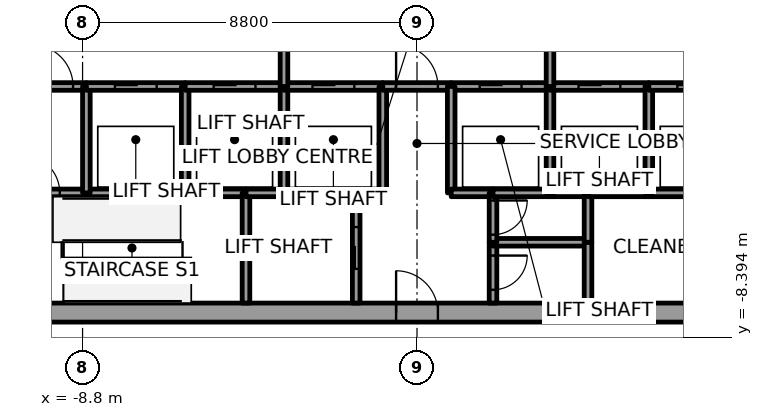
"""IFC4 building model, lengths in metres.
Left out: names, types, materials, properties, quantities, classifications, styles, units other than length and angle.
Written with IfcOpenShell. Run it as: python <this file> out.ifc"""

import sys

from ifc_helpers import new_model, si_unit, direction, frame, frame_2d, origin, place, context, subcontext, project, spatial, rectangle, extrude, element, fill, save


model = new_model("IFC4")
c1 = context("Model", 3, precision=1e-05, world=origin(), true_north=direction((0.0, 1.0)))
c2 = subcontext(c1, "Body", "Model", "MODEL_VIEW")
j1 = project(units=[si_unit("LENGTHUNIT", "METRE"), si_unit("PLANEANGLEUNIT", "RADIAN")], contexts=[c1])
p1 = place(None, origin())
s1 = spatial("IfcSite", under=j1, at=p1, CompositionType="ELEMENT")
p2 = place(p1, origin())
s2 = spatial("IfcBuilding", under=s1, at=p2, CompositionType="ELEMENT")
p3 = place(p2, frame((0.0, 0.0, 205.8)))
s3 = spatial("IfcBuildingStorey", under=s2, at=p3, CompositionType="ELEMENT", Elevation=205.8)
p4 = place(p3, frame((-11.0, -7.75, 0.0), z_axis=(0.0, 0.0, 1.0), x_axis=(1.0, 0.0, 0.0)))
e1 = element("IfcWall", 1, at=p4, inside=s3, PredefinedType="SHEAR", context=c2, shape_type="SweptSolid", body=[
    extrude(rectangle(XDim=22.0, YDim=0.5, at=frame_2d((11.0, 0.0))), origin(), (0.0, 0.0, 1.0), 4.0),
])
p5 = place(p4, frame((10.45, 0.0, 0.0)))
e2 = element("IfcOpeningElement", 2, at=p5, cuts=e1, PredefinedType="OPENING", context=c2, shape_type="SweptSolid", body=[
    extrude(rectangle(XDim=1.1, YDim=2.1, at=frame_2d((0.55, 1.05))), frame((0.0, 0.25, 0.0), z_axis=(0.0, -1.0, 0.0), x_axis=(1.0, 0.0, 0.0)), (0.0, 0.0, 1.0), 0.5),
])
p6 = place(p3, frame((-10.5, -4.6, 0.0), z_axis=(0.0, 0.0, 1.0), x_axis=(1.0, 0.0, 0.0)))
e3 = element("IfcWall", 3, at=p6, inside=s3, PredefinedType="SOLIDWALL", context=c2, shape_type="SweptSolid", body=[
    extrude(rectangle(XDim=1.8, YDim=0.2, at=frame_2d((0.9, 0.0))), origin(), (0.0, 0.0, 1.0), 3.85),
])
p7 = place(p6, frame((0.1, 0.0, 0.0)))
e4 = element("IfcOpeningElement", 4, at=p7, cuts=e3, PredefinedType="OPENING", context=c2, shape_type="SweptSolid", body=[
    extrude(rectangle(XDim=1.0, YDim=2.1, at=frame_2d((0.5, 1.05))), frame((0.0, 0.1, 0.0), z_axis=(0.0, -1.0, 0.0), x_axis=(1.0, 0.0, 0.0)), (0.0, 0.0, 1.0), 0.2),
])
p8 = place(p3, frame((-10.5, -1.8, 0.0), z_axis=(0.0, 0.0, 1.0), x_axis=(1.0, 0.0, 0.0)))
e5 = element("IfcWall", 5, at=p8, inside=s3, PredefinedType="SOLIDWALL", context=c2, shape_type="SweptSolid", body=[
    extrude(rectangle(XDim=1.8, YDim=0.2, at=frame_2d((0.9, 0.0))), origin(), (0.0, 0.0, 1.0), 3.85),
])
p9 = place(p8, frame((0.35, 0.0, 0.0)))
e6 = element("IfcOpeningElement", 6, at=p9, cuts=e5, PredefinedType="OPENING", context=c2, shape_type="SweptSolid", body=[
    extrude(rectangle(XDim=1.1, YDim=2.1, at=frame_2d((0.55, 1.05))), frame((0.0, 0.1, 0.0), z_axis=(0.0, -1.0, 0.0), x_axis=(1.0, 0.0, 0.0)), (0.0, 0.0, 1.0), 0.2),
])
p10 = place(p3, frame((-8.7, -4.6, 0.0), z_axis=(0.0, 0.0, 1.0), x_axis=(1.0, 0.0, 0.0)))
e7 = element("IfcWall", 7, at=p10, inside=s3, PredefinedType="SOLIDWALL", context=c2, shape_type="SweptSolid", body=[
    extrude(rectangle(XDim=2.6, YDim=0.2, at=frame_2d((1.3, 0.0))), origin(), (0.0, 0.0, 1.0), 3.85),
])
p11 = place(p3, frame((-8.7, -4.6, 0.0), z_axis=(0.0, 0.0, 1.0), x_axis=(0.0, 1.0, 0.0)))
e8 = element("IfcWall", 8, at=p11, inside=s3, PredefinedType="SOLIDWALL", context=c2, shape_type="SweptSolid", body=[
    extrude(rectangle(XDim=2.8, YDim=0.2, at=frame_2d((1.4, 0.0))), origin(), (0.0, 0.0, 1.0), 3.85),
])
p12 = place(p3, frame((-8.7, -1.8, 0.0), z_axis=(0.0, 0.0, 1.0), x_axis=(1.0, 0.0, 0.0)))
e9 = element("IfcWall", 9, at=p12, inside=s3, PredefinedType="SOLIDWALL", context=c2, shape_type="SweptSolid", body=[
    extrude(rectangle(XDim=2.6, YDim=0.2, at=frame_2d((1.3, 0.0))), origin(), (0.0, 0.0, 1.0), 3.85),
])
p13 = place(p12, frame((0.75, 0.0, 0.0)))
e10 = element("IfcOpeningElement", 10, at=p13, cuts=e9, PredefinedType="OPENING", context=c2, shape_type="SweptSolid", body=[
    extrude(rectangle(XDim=1.1, YDim=2.1, at=frame_2d((0.55, 1.05))), frame((0.0, 0.1, 0.0), z_axis=(0.0, -1.0, 0.0), x_axis=(1.0, 0.0, 0.0)), (0.0, 0.0, 1.0), 0.2),
])
p14 = place(p3, frame((-6.1, -4.6, 0.0), z_axis=(0.0, 0.0, 1.0), x_axis=(1.0, 0.0, 0.0)))
e11 = element("IfcWall", 11, at=p14, inside=s3, PredefinedType="SOLIDWALL", context=c2, shape_type="SweptSolid", body=[
    extrude(rectangle(XDim=1.6, YDim=0.2, at=frame_2d((0.8, 0.0))), origin(), (0.0, 0.0, 1.0), 3.85),
])
p15 = place(p3, frame((-6.1, -4.6, 0.0), z_axis=(0.0, 0.0, 1.0), x_axis=(0.0, 1.0, 0.0)))
e12 = element("IfcWall", 12, at=p15, inside=s3, PredefinedType="SOLIDWALL", context=c2, shape_type="SweptSolid", body=[
    extrude(rectangle(XDim=2.8, YDim=0.2, at=frame_2d((1.4, 0.0))), origin(), (0.0, 0.0, 1.0), 3.85),
])
p16 = place(p3, frame((-6.1, -1.8, 0.0), z_axis=(0.0, 0.0, 1.0), x_axis=(1.0, 0.0, 0.0)))
e13 = element("IfcWall", 13, at=p16, inside=s3, PredefinedType="SOLIDWALL", context=c2, shape_type="SweptSolid", body=[
    extrude(rectangle(XDim=2.6, YDim=0.2, at=frame_2d((1.3, 0.0))), origin(), (0.0, 0.0, 1.0), 3.85),
])
p17 = place(p16, frame((0.75, 0.0, 0.0)))
e14 = element("IfcOpeningElement", 14, at=p17, cuts=e13, PredefinedType="OPENING", context=c2, shape_type="SweptSolid", body=[
    extrude(rectangle(XDim=1.1, YDim=2.1, at=frame_2d((0.55, 1.05))), frame((0.0, 0.1, 0.0), z_axis=(0.0, -1.0, 0.0), x_axis=(1.0, 0.0, 0.0)), (0.0, 0.0, 1.0), 0.2),
])
p18 = place(p3, frame((-4.5, -4.6, 0.0), z_axis=(0.0, 0.0, 1.0), x_axis=(0.0, -1.0, 0.0)))
e15 = element("IfcWall", 15, at=p18, inside=s3, PredefinedType="SOLIDWALL", context=c2, shape_type="SweptSolid", body=[
    extrude(rectangle(XDim=2.9, YDim=0.2, at=frame_2d((1.45, 0.0))), origin(), (0.0, 0.0, 1.0), 3.85),
])
p19 = place(p3, frame((-4.5, -4.6, 0.0), z_axis=(0.0, 0.0, 1.0), x_axis=(1.0, 0.0, 0.0)))
e16 = element("IfcWall", 16, at=p19, inside=s3, PredefinedType="SOLIDWALL", context=c2, shape_type="SweptSolid", body=[
    extrude(rectangle(XDim=1.0, YDim=0.2, at=frame_2d((0.5, 0.0))), origin(), (0.0, 0.0, 1.0), 3.85),
])
p20 = place(p3, frame((-3.5, -4.6, 0.0), z_axis=(0.0, 0.0, 1.0), x_axis=(1.0, 0.0, 0.0)))
e17 = element("IfcWall", 17, at=p20, inside=s3, PredefinedType="SOLIDWALL", context=c2, shape_type="SweptSolid", body=[
    extrude(rectangle(XDim=1.9, YDim=0.2, at=frame_2d((0.95, 0.0))), origin(), (0.0, 0.0, 1.0), 3.85),
])
p21 = place(p3, frame((-3.5, -4.6, 0.0), z_axis=(0.0, 0.0, 1.0), x_axis=(0.0, 1.0, 0.0)))
e18 = element("IfcWall", 18, at=p21, inside=s3, PredefinedType="SOLIDWALL", context=c2, shape_type="SweptSolid", body=[
    extrude(rectangle(XDim=2.8, YDim=0.2, at=frame_2d((1.4, 0.0))), origin(), (0.0, 0.0, 1.0), 3.85),
])
p22 = place(p3, frame((-3.5, -1.8, 0.0), z_axis=(0.0, 0.0, 1.0), x_axis=(1.0, 0.0, 0.0)))
e19 = element("IfcWall", 19, at=p22, inside=s3, PredefinedType="SOLIDWALL", context=c2, shape_type="SweptSolid", body=[
    extrude(rectangle(XDim=2.6, YDim=0.2, at=frame_2d((1.3, 0.0))), origin(), (0.0, 0.0, 1.0), 3.85),
])
p23 = place(p22, frame((0.75, 0.0, 0.0)))
e20 = element("IfcOpeningElement", 20, at=p23, cuts=e19, PredefinedType="OPENING", context=c2, shape_type="SweptSolid", body=[
    extrude(rectangle(XDim=1.1, YDim=2.1, at=frame_2d((0.55, 1.05))), frame((0.0, 0.1, 0.0), z_axis=(0.0, -1.0, 0.0), x_axis=(1.0, 0.0, 0.0)), (0.0, 0.0, 1.0), 0.2),
])
p24 = place(p3, frame((-3.5, 1.8, 0.0), z_axis=(0.0, 0.0, 1.0), x_axis=(0.0, -1.0, 0.0)))
e21 = element("IfcWall", 21, at=p24, inside=s3, PredefinedType="SOLIDWALL", context=c2, shape_type="SweptSolid", body=[
    extrude(rectangle(XDim=3.6, YDim=0.2, at=frame_2d((1.8, 0.0))), origin(), (0.0, 0.0, 1.0), 3.85),
])
p25 = place(p24, frame((1.05, 0.0, 0.0)))
e22 = element("IfcOpeningElement", 22, at=p25, cuts=e21, PredefinedType="OPENING", context=c2, shape_type="SweptSolid", body=[
    extrude(rectangle(XDim=1.5, YDim=2.1, at=frame_2d((0.75, 1.05))), frame((0.0, 0.1, 0.0), z_axis=(0.0, -1.0, 0.0), x_axis=(1.0, 0.0, 0.0)), (0.0, 0.0, 1.0), 0.2),
])
p26 = place(p3, frame((-1.6, -7.5, 0.0), z_axis=(0.0, 0.0, 1.0), x_axis=(0.0, 1.0, 0.0)))
e23 = element("IfcWall", 23, at=p26, inside=s3, PredefinedType="SOLIDWALL", context=c2, shape_type="SweptSolid", body=[
    extrude(rectangle(XDim=2.9, YDim=0.2, at=frame_2d((1.45, 0.0))), origin(), (0.0, 0.0, 1.0), 3.85),
])
p27 = place(p26, frame((0.9, 0.0, 0.0)))
e24 = element("IfcOpeningElement", 24, at=p27, cuts=e23, PredefinedType="OPENING", context=c2, shape_type="SweptSolid", body=[
    extrude(rectangle(XDim=1.1, YDim=2.1, at=frame_2d((0.55, 1.05))), frame((0.0, 0.1, 0.0), z_axis=(0.0, -1.0, 0.0), x_axis=(1.0, 0.0, 0.0)), (0.0, 0.0, 1.0), 0.2),
])
p28 = place(p3, frame((-1.6, -4.6, 0.0), z_axis=(0.0, 0.0, 1.0), x_axis=(1.0, 0.0, 0.0)))
e25 = element("IfcWall", 25, at=p28, inside=s3, PredefinedType="SOLIDWALL", context=c2, shape_type="SweptSolid", body=[
    extrude(rectangle(XDim=0.7, YDim=0.2, at=frame_2d((0.35, 0.0))), origin(), (0.0, 0.0, 1.0), 3.85),
])
p29 = place(p3, frame((-0.9, -4.6, 0.0), z_axis=(0.0, 0.0, 1.0), x_axis=(0.0, 1.0, 0.0)))
e26 = element("IfcWall", 26, at=p29, inside=s3, PredefinedType="SOLIDWALL", context=c2, shape_type="SweptSolid", body=[
    extrude(rectangle(XDim=2.8, YDim=0.2, at=frame_2d((1.4, 0.0))), origin(), (0.0, 0.0, 1.0), 3.85),
])
p30 = place(p3, frame((-0.9, -1.8, 0.0), z_axis=(0.0, 0.0, 1.0), x_axis=(1.0, 0.0, 0.0)))
e27 = element("IfcWall", 27, at=p30, inside=s3, PredefinedType="SOLIDWALL", context=c2, shape_type="SweptSolid", body=[
    extrude(rectangle(XDim=1.8, YDim=0.2, at=frame_2d((0.9, 0.0))), origin(), (0.0, 0.0, 1.0), 3.85),
])
p31 = place(p30, frame((0.35, 0.0, 0.0)))
e28 = element("IfcOpeningElement", 28, at=p31, cuts=e27, PredefinedType="OPENING", context=c2, shape_type="SweptSolid", body=[
    extrude(rectangle(XDim=1.1, YDim=2.1, at=frame_2d((0.55, 1.05))), frame((0.0, 0.1, 0.0), z_axis=(0.0, -1.0, 0.0), x_axis=(1.0, 0.0, 0.0)), (0.0, 0.0, 1.0), 0.2),
])
p32 = place(p3, frame((0.9, -1.8, 0.0), z_axis=(0.0, 0.0, 1.0), x_axis=(1.0, 0.0, 0.0)))
e29 = element("IfcWall", 29, at=p32, inside=s3, PredefinedType="SOLIDWALL", context=c2, shape_type="SweptSolid", body=[
    extrude(rectangle(XDim=2.6, YDim=0.2, at=frame_2d((1.3, 0.0))), origin(), (0.0, 0.0, 1.0), 3.85),
])
p33 = place(p32, frame((0.75, 0.0, 0.0)))
e30 = element("IfcOpeningElement", 30, at=p33, cuts=e29, PredefinedType="OPENING", context=c2, shape_type="SweptSolid", body=[
    extrude(rectangle(XDim=1.1, YDim=2.1, at=frame_2d((0.55, 1.05))), frame((0.0, 0.1, 0.0), z_axis=(0.0, -1.0, 0.0), x_axis=(1.0, 0.0, 0.0)), (0.0, 0.0, 1.0), 0.2),
])
p34 = place(p3, frame((0.9, -1.8, 0.0), z_axis=(0.0, 0.0, 1.0), x_axis=(0.0, -1.0, 0.0)))
e31 = element("IfcWall", 31, at=p34, inside=s3, PredefinedType="SOLIDWALL", context=c2, shape_type="SweptSolid", body=[
    extrude(rectangle(XDim=2.8, YDim=0.2, at=frame_2d((1.4, 0.0))), origin(), (0.0, 0.0, 1.0), 3.85),
])
p35 = place(p3, frame((0.9, -4.6, 0.0), z_axis=(0.0, 0.0, 1.0), x_axis=(1.0, 0.0, 0.0)))
e32 = element("IfcWall", 32, at=p35, inside=s3, PredefinedType="SOLIDWALL", context=c2, shape_type="SweptSolid", body=[
    extrude(rectangle(XDim=1.1, YDim=0.2, at=frame_2d((0.55, 0.0))), origin(), (0.0, 0.0, 1.0), 3.85),
])
p36 = place(p3, frame((2.0, -5.9, 0.0), z_axis=(0.0, 0.0, 1.0), x_axis=(0.0, -1.0, 0.0)))
e33 = element("IfcWall", 33, at=p36, inside=s3, PredefinedType="SOLIDWALL", context=c2, shape_type="SweptSolid", body=[
    extrude(rectangle(XDim=1.6, YDim=0.2, at=frame_2d((0.8, 0.0))), origin(), (0.0, 0.0, 1.0), 3.85),
])
p37 = place(p36, frame((0.35, 0.0, 0.0)))
e34 = element("IfcOpeningElement", 34, at=p37, cuts=e33, PredefinedType="OPENING", context=c2, shape_type="SweptSolid", body=[
    extrude(rectangle(XDim=0.9, YDim=2.1, at=frame_2d((0.45, 1.05))), frame((0.0, 0.1, 0.0), z_axis=(0.0, -1.0, 0.0), x_axis=(1.0, 0.0, 0.0)), (0.0, 0.0, 1.0), 0.2),
])
p38 = place(p3, frame((4.5, -5.9, 0.0), z_axis=(0.0, 0.0, 1.0), x_axis=(-1.0, 0.0, 0.0)))
e35 = element("IfcWall", 35, at=p38, inside=s3, PredefinedType="SOLIDWALL", context=c2, shape_type="SweptSolid", body=[
    extrude(rectangle(XDim=2.5, YDim=0.2, at=frame_2d((1.25, 0.0))), origin(), (0.0, 0.0, 1.0), 3.85),
])
p39 = place(p3, frame((2.0, -4.6, 0.0), z_axis=(0.0, 0.0, 1.0), x_axis=(0.0, -1.0, 0.0)))
e36 = element("IfcWall", 36, at=p39, inside=s3, PredefinedType="SOLIDWALL", context=c2, shape_type="SweptSolid", body=[
    extrude(rectangle(XDim=1.3, YDim=0.2, at=frame_2d((0.65, 0.0))), origin(), (0.0, 0.0, 1.0), 3.85),
])
p40 = place(p39, frame((0.2, 0.0, 0.0)))
e37 = element("IfcOpeningElement", 37, at=p40, cuts=e36, PredefinedType="OPENING", context=c2, shape_type="SweptSolid", body=[
    extrude(rectangle(XDim=0.9, YDim=2.1, at=frame_2d((0.45, 1.05))), frame((0.0, 0.1, 0.0), z_axis=(0.0, -1.0, 0.0), x_axis=(1.0, 0.0, 0.0)), (0.0, 0.0, 1.0), 0.2),
])
p41 = place(p3, frame((3.5, -4.6, 0.0), z_axis=(0.0, 0.0, 1.0), x_axis=(-1.0, 0.0, 0.0)))
e38 = element("IfcWall", 38, at=p41, inside=s3, PredefinedType="SOLIDWALL", context=c2, shape_type="SweptSolid", body=[
    extrude(rectangle(XDim=1.5, YDim=0.2, at=frame_2d((0.75, 0.0))), origin(), (0.0, 0.0, 1.0), 3.85),
])
p42 = place(p3, frame((4.5, -4.6, 0.0), z_axis=(0.0, 0.0, 1.0), x_axis=(-1.0, 0.0, 0.0)))
e39 = element("IfcWall", 39, at=p42, inside=s3, PredefinedType="SOLIDWALL", context=c2, shape_type="SweptSolid", body=[
    extrude(rectangle(XDim=1.0, YDim=0.2, at=frame_2d((0.5, 0.0))), origin(), (0.0, 0.0, 1.0), 3.85),
])
p43 = place(p3, frame((3.5, -4.6, 0.0), z_axis=(0.0, 0.0, 1.0), x_axis=(0.0, 1.0, 0.0)))
e40 = element("IfcWall", 40, at=p43, inside=s3, PredefinedType="SOLIDWALL", context=c2, shape_type="SweptSolid", body=[
    extrude(rectangle(XDim=2.8, YDim=0.2, at=frame_2d((1.4, 0.0))), origin(), (0.0, 0.0, 1.0), 3.85),
])
p44 = place(p3, frame((3.5, -1.8, 0.0), z_axis=(0.0, 0.0, 1.0), x_axis=(1.0, 0.0, 0.0)))
e41 = element("IfcWall", 41, at=p44, inside=s3, PredefinedType="SOLIDWALL", context=c2, shape_type="SweptSolid", body=[
    extrude(rectangle(XDim=2.6, YDim=0.2, at=frame_2d((1.3, 0.0))), origin(), (0.0, 0.0, 1.0), 3.85),
])
p45 = place(p44, frame((0.75, 0.0, 0.0)))
e42 = element("IfcOpeningElement", 42, at=p45, cuts=e41, PredefinedType="OPENING", context=c2, shape_type="SweptSolid", body=[
    extrude(rectangle(XDim=1.1, YDim=2.1, at=frame_2d((0.55, 1.05))), frame((0.0, 0.1, 0.0), z_axis=(0.0, -1.0, 0.0), x_axis=(1.0, 0.0, 0.0)), (0.0, 0.0, 1.0), 0.2),
])
p46 = place(p3, frame((3.5, -1.8, 0.0), z_axis=(0.0, 0.0, 1.0), x_axis=(0.0, 1.0, 0.0)))
e43 = element("IfcWall", 43, at=p46, inside=s3, PredefinedType="SOLIDWALL", context=c2, shape_type="SweptSolid", body=[
    extrude(rectangle(XDim=3.6, YDim=0.2, at=frame_2d((1.8, 0.0))), origin(), (0.0, 0.0, 1.0), 3.85),
])
p47 = place(p46, frame((1.05, 0.0, 0.0)))
e44 = element("IfcOpeningElement", 44, at=p47, cuts=e43, PredefinedType="OPENING", context=c2, shape_type="SweptSolid", body=[
    extrude(rectangle(XDim=1.5, YDim=2.1, at=frame_2d((0.75, 1.05))), frame((0.0, 0.1, 0.0), z_axis=(0.0, -1.0, 0.0), x_axis=(1.0, 0.0, 0.0)), (0.0, 0.0, 1.0), 0.2),
])
p48 = place(p3, frame((4.5, -5.9, 0.0), z_axis=(0.0, 0.0, 1.0), x_axis=(0.0, -1.0, 0.0)))
e45 = element("IfcWall", 45, at=p48, inside=s3, PredefinedType="SOLIDWALL", context=c2, shape_type="SweptSolid", body=[
    extrude(rectangle(XDim=1.6, YDim=0.2, at=frame_2d((0.8, 0.0))), origin(), (0.0, 0.0, 1.0), 3.85),
])
p49 = place(p3, frame((4.5, -4.6, 0.0), z_axis=(0.0, 0.0, 1.0), x_axis=(0.0, -1.0, 0.0)))
e46 = element("IfcWall", 46, at=p49, inside=s3, PredefinedType="SOLIDWALL", context=c2, shape_type="SweptSolid", body=[
    extrude(rectangle(XDim=1.3, YDim=0.2, at=frame_2d((0.65, 0.0))), origin(), (0.0, 0.0, 1.0), 3.85),
])
p50 = place(p3, frame((6.1, -4.6, 0.0), z_axis=(0.0, 0.0, 1.0), x_axis=(-1.0, 0.0, 0.0)))
e47 = element("IfcWall", 47, at=p50, inside=s3, PredefinedType="SOLIDWALL", context=c2, shape_type="SweptSolid", body=[
    extrude(rectangle(XDim=1.6, YDim=0.2, at=frame_2d((0.8, 0.0))), origin(), (0.0, 0.0, 1.0), 3.85),
])
p51 = place(p3, frame((8.7, -4.6, 0.0), z_axis=(0.0, 0.0, 1.0), x_axis=(-1.0, 0.0, 0.0)))
e48 = element("IfcWall", 48, at=p51, inside=s3, PredefinedType="SOLIDWALL", context=c2, shape_type="SweptSolid", body=[
    extrude(rectangle(XDim=2.6, YDim=0.2, at=frame_2d((1.3, 0.0))), origin(), (0.0, 0.0, 1.0), 3.85),
])
p52 = place(p3, frame((6.1, -4.6, 0.0), z_axis=(0.0, 0.0, 1.0), x_axis=(0.0, 1.0, 0.0)))
e49 = element("IfcWall", 49, at=p52, inside=s3, PredefinedType="SOLIDWALL", context=c2, shape_type="SweptSolid", body=[
    extrude(rectangle(XDim=2.8, YDim=0.2, at=frame_2d((1.4, 0.0))), origin(), (0.0, 0.0, 1.0), 3.85),
])
p53 = place(p3, frame((6.1, -1.8, 0.0), z_axis=(0.0, 0.0, 1.0), x_axis=(1.0, 0.0, 0.0)))
e50 = element("IfcWall", 50, at=p53, inside=s3, PredefinedType="SOLIDWALL", context=c2, shape_type="SweptSolid", body=[
    extrude(rectangle(XDim=2.6, YDim=0.2, at=frame_2d((1.3, 0.0))), origin(), (0.0, 0.0, 1.0), 3.85),
])
p54 = place(p53, frame((0.75, 0.0, 0.0)))
e51 = element("IfcOpeningElement", 51, at=p54, cuts=e50, PredefinedType="OPENING", context=c2, shape_type="SweptSolid", body=[
    extrude(rectangle(XDim=1.1, YDim=2.1, at=frame_2d((0.55, 1.05))), frame((0.0, 0.1, 0.0), z_axis=(0.0, -1.0, 0.0), x_axis=(1.0, 0.0, 0.0)), (0.0, 0.0, 1.0), 0.2),
])
p55 = place(p13, origin())
e52 = element("IfcDoor", 52, at=p55, inside=s3, OperationType="SLIDING_TO_RIGHT", PredefinedType="DOOR", context=c2, shape_type="SweptSolid", body=[
    extrude(rectangle(XDim=1.1, YDim=2.1, at=frame_2d((0.55, 1.05))), frame((0.0, 0.025, 0.0), z_axis=(0.0, -1.0, 0.0), x_axis=(1.0, 0.0, 0.0)), (0.0, 0.0, 1.0), 0.05),
])
fill(e10, e52)
p56 = place(p17, origin())
e53 = element("IfcDoor", 53, at=p56, inside=s3, OperationType="SLIDING_TO_RIGHT", PredefinedType="DOOR", context=c2, shape_type="SweptSolid", body=[
    extrude(rectangle(XDim=1.1, YDim=2.1, at=frame_2d((0.55, 1.05))), frame((0.0, 0.025, 0.0), z_axis=(0.0, -1.0, 0.0), x_axis=(1.0, 0.0, 0.0)), (0.0, 0.0, 1.0), 0.05),
])
fill(e14, e53)
p57 = place(p23, origin())
e54 = element("IfcDoor", 54, at=p57, inside=s3, OperationType="SLIDING_TO_RIGHT", PredefinedType="DOOR", context=c2, shape_type="SweptSolid", body=[
    extrude(rectangle(XDim=1.1, YDim=2.1, at=frame_2d((0.55, 1.05))), frame((0.0, 0.025, 0.0), z_axis=(0.0, -1.0, 0.0), x_axis=(1.0, 0.0, 0.0)), (0.0, 0.0, 1.0), 0.05),
])
fill(e20, e54)
p58 = place(p33, origin())
e55 = element("IfcDoor", 55, at=p58, inside=s3, OperationType="SLIDING_TO_LEFT", PredefinedType="DOOR", context=c2, shape_type="SweptSolid", body=[
    extrude(rectangle(XDim=1.1, YDim=2.1, at=frame_2d((0.55, 1.05))), frame((0.0, 0.025, 0.0), z_axis=(0.0, -1.0, 0.0), x_axis=(1.0, 0.0, 0.0)), (0.0, 0.0, 1.0), 0.05),
])
fill(e30, e55)
p59 = place(p45, origin())
e56 = element("IfcDoor", 56, at=p59, inside=s3, OperationType="SLIDING_TO_RIGHT", PredefinedType="DOOR", context=c2, shape_type="SweptSolid", body=[
    extrude(rectangle(XDim=1.1, YDim=2.1, at=frame_2d((0.55, 1.05))), frame((0.0, 0.025, 0.0), z_axis=(0.0, -1.0, 0.0), x_axis=(1.0, 0.0, 0.0)), (0.0, 0.0, 1.0), 0.05),
])
fill(e42, e56)
p60 = place(p54, origin())
e57 = element("IfcDoor", 57, at=p60, inside=s3, OperationType="SLIDING_TO_RIGHT", PredefinedType="DOOR", context=c2, shape_type="SweptSolid", body=[
    extrude(rectangle(XDim=1.1, YDim=2.1, at=frame_2d((0.55, 1.05))), frame((0.0, 0.025, 0.0), z_axis=(0.0, -1.0, 0.0), x_axis=(1.0, 0.0, 0.0)), (0.0, 0.0, 1.0), 0.05),
])
fill(e51, e57)
p61 = place(p27, origin())
e58 = element("IfcDoor", 58, at=p61, inside=s3, OperationType="SLIDING_TO_LEFT", PredefinedType="DOOR", context=c2, shape_type="SweptSolid", body=[
    extrude(rectangle(XDim=1.1, YDim=2.1, at=frame_2d((0.55, 1.05))), frame((0.0, 0.025, 0.0), z_axis=(0.0, -1.0, 0.0), x_axis=(1.0, 0.0, 0.0)), (0.0, 0.0, 1.0), 0.05),
])
fill(e24, e58)
p62 = place(p9, origin())
e59 = element("IfcDoor", 59, at=p62, inside=s3, OperationType="SINGLE_SWING_RIGHT", PredefinedType="DOOR", context=c2, shape_type="SweptSolid", body=[
    extrude(rectangle(XDim=1.1, YDim=2.1, at=frame_2d((0.55, 1.05))), frame((0.0, 0.025, 0.0), z_axis=(0.0, -1.0, 0.0), x_axis=(1.0, 0.0, 0.0)), (0.0, 0.0, 1.0), 0.05),
])
fill(e6, e59)
p63 = place(p31, origin())
e60 = element("IfcDoor", 60, at=p63, inside=s3, OperationType="SINGLE_SWING_LEFT", PredefinedType="DOOR", context=c2, shape_type="SweptSolid", body=[
    extrude(rectangle(XDim=1.1, YDim=2.1, at=frame_2d((0.55, 1.05))), frame((0.0, 0.025, 0.0), z_axis=(0.0, -1.0, 0.0), x_axis=(1.0, 0.0, 0.0)), (0.0, 0.0, 1.0), 0.05),
])
fill(e28, e60)
p64 = place(p7, origin())
e61 = element("IfcDoor", 61, at=p64, inside=s3, OperationType="SINGLE_SWING_LEFT", PredefinedType="DOOR", context=c2, shape_type="SweptSolid", body=[
    extrude(rectangle(XDim=1.0, YDim=2.1, at=frame_2d((0.5, 1.05))), frame((0.0, 0.025, 0.0), z_axis=(0.0, -1.0, 0.0), x_axis=(1.0, 0.0, 0.0)), (0.0, 0.0, 1.0), 0.05),
])
fill(e4, e61)
p65 = place(p37, origin())
e62 = element("IfcDoor", 62, at=p65, inside=s3, OperationType="SINGLE_SWING_LEFT", PredefinedType="DOOR", context=c2, shape_type="SweptSolid", body=[
    extrude(rectangle(XDim=0.9, YDim=2.1, at=frame_2d((0.45, 1.05))), frame((0.0, 0.025, 0.0), z_axis=(0.0, -1.0, 0.0), x_axis=(1.0, 0.0, 0.0)), (0.0, 0.0, 1.0), 0.05),
])
fill(e34, e62)
p66 = place(p40, origin())
e63 = element("IfcDoor", 63, at=p66, inside=s3, OperationType="SINGLE_SWING_LEFT", PredefinedType="DOOR", context=c2, shape_type="SweptSolid", body=[
    extrude(rectangle(XDim=0.9, YDim=2.1, at=frame_2d((0.45, 1.05))), frame((0.0, 0.025, 0.0), z_axis=(0.0, -1.0, 0.0), x_axis=(1.0, 0.0, 0.0)), (0.0, 0.0, 1.0), 0.05),
])
fill(e37, e63)
p67 = place(p5, origin())
e64 = element("IfcDoor", 64, at=p67, inside=s3, OperationType="SINGLE_SWING_RIGHT", PredefinedType="DOOR", context=c2, shape_type="SweptSolid", body=[
    extrude(rectangle(XDim=1.1, YDim=2.1, at=frame_2d((0.55, 1.05))), frame((0.0, 0.025, 0.0), z_axis=(0.0, -1.0, 0.0), x_axis=(1.0, 0.0, 0.0)), (0.0, 0.0, 1.0), 0.05),
])
fill(e2, e64)
save(model, sys.argv[1])
